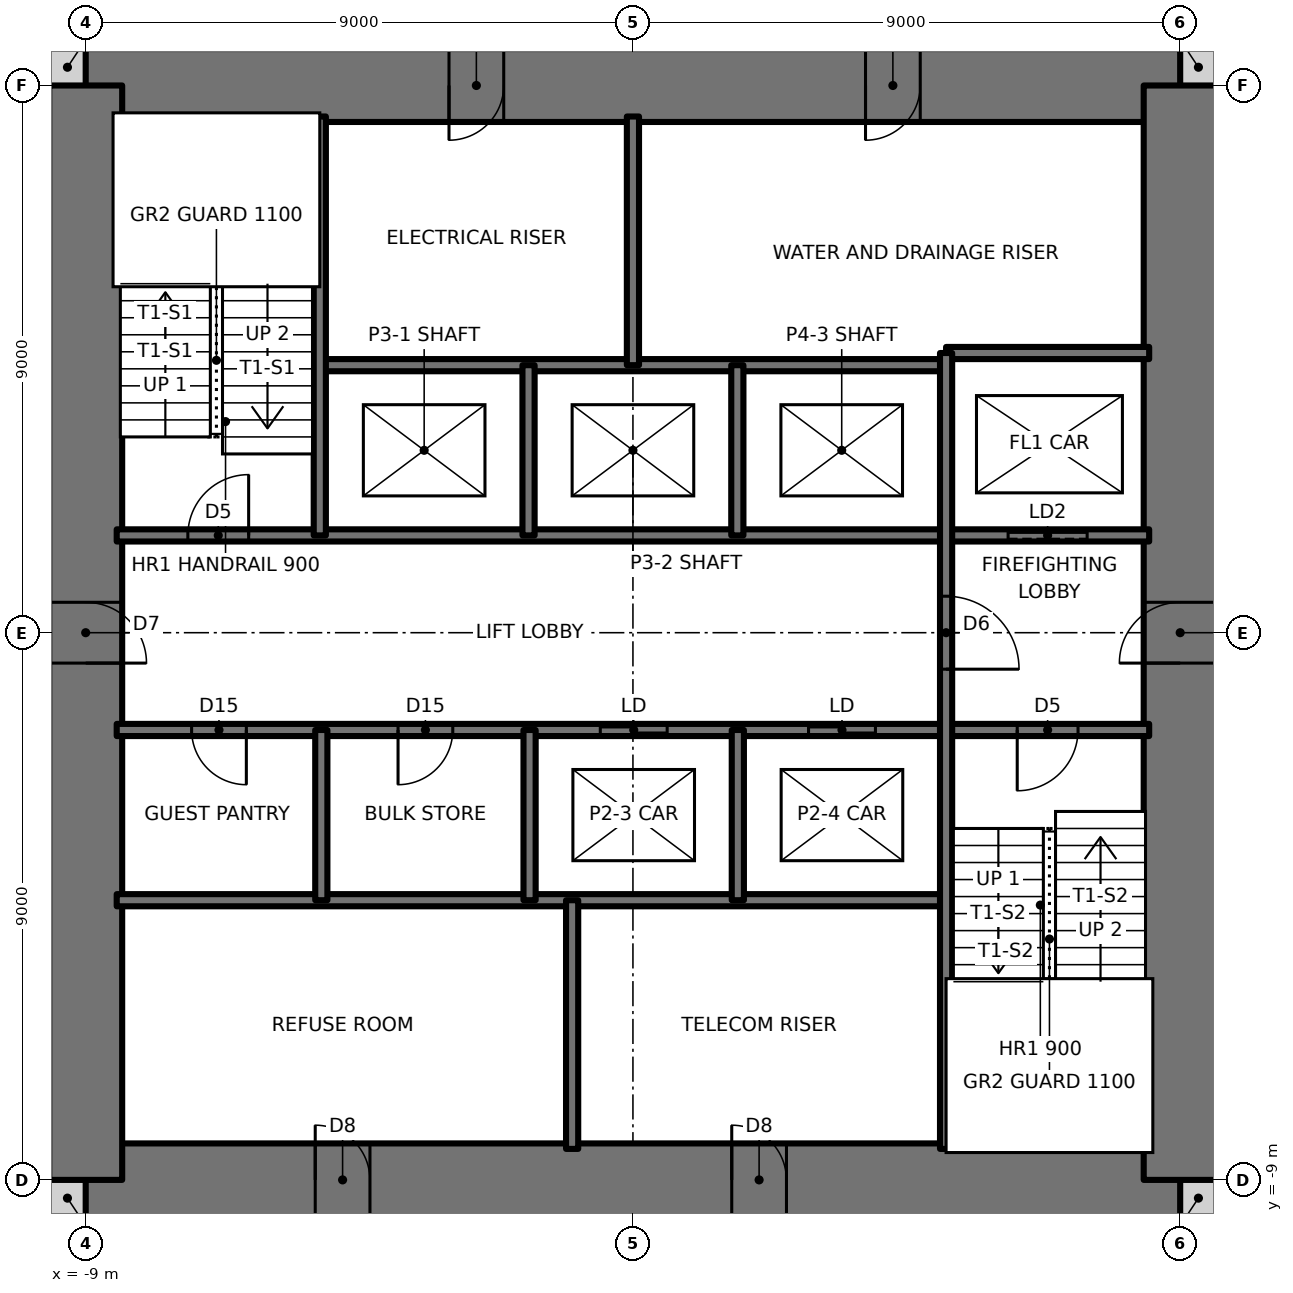
"""IFC4 building model, lengths in metres.
Left out: names, types, materials, properties, quantities, classifications, styles, units other than length and angle.
Written with IfcOpenShell. Run it as: python <this file> out.ifc"""

import sys

from ifc_helpers import new_model, si_unit, direction, frame, frame_2d, origin, place, context, subcontext, project, spatial, rectangle, extrude, element, fill, save


model = new_model("IFC4")
c1 = context("Model", 3, precision=1e-05, world=origin(), true_north=direction((0.0, 1.0)))
c2 = subcontext(c1, "Body", "Model", "MODEL_VIEW")
j1 = project(units=[si_unit("LENGTHUNIT", "METRE"), si_unit("PLANEANGLEUNIT", "RADIAN")], contexts=[c1])
p1 = place(None, origin())
s1 = spatial("IfcSite", under=j1, at=p1, CompositionType="ELEMENT")
p2 = place(p1, origin())
s2 = spatial("IfcBuilding", under=s1, at=p2, CompositionType="ELEMENT")
p3 = place(p2, frame((0.0, 0.0, 80.5)))
s3 = spatial("IfcBuildingStorey", under=s2, at=p3, CompositionType="ELEMENT", Elevation=80.5)
for number, where, z_axis, x_axis in (
    (1, (-9.6, -9.3, 0.0), (0.0, 0.0, 1.0), (1.0, 0.0, 0.0)),
    (2, (9.0, -9.3, 0.0), (0.0, 0.0, 1.0), (1.0, 0.0, 0.0)),
    (3, (9.0, 9.3, 0.0), (0.0, 0.0, 1.0), (1.0, 0.0, 0.0)),
    (4, (-9.6, 9.3, 0.0), (0.0, 0.0, 1.0), (1.0, 0.0, 0.0)),
):
    element("IfcWall", number, at=place(p3, frame(where, z_axis=z_axis, x_axis=x_axis)), inside=s3, PredefinedType="SOLIDWALL", context=c2, shape_type="SweptSolid", body=[
        extrude(rectangle(XDim=0.6, YDim=0.6, at=frame_2d((0.3, 0.0))), origin(), (0.0, 0.0, 1.0), 3.5),
    ])
p4 = place(p3, frame((-9.0, -9.0, 0.0), z_axis=(0.0, 0.0, 1.0), x_axis=(1.0, 0.0, 0.0)))
e5 = element("IfcWall", 5, at=p4, inside=s3, PredefinedType="SHEAR", context=c2, shape_type="SweptSolid", body=[
    extrude(rectangle(XDim=18.0, YDim=1.2, at=frame_2d((9.0, 0.0))), origin(), (0.0, 0.0, 1.0), 3.5),
])
p5 = place(p4, frame((3.775, 0.0, 0.0)))
e6 = element("IfcOpeningElement", 6, at=p5, cuts=e5, PredefinedType="OPENING", context=c2, shape_type="SweptSolid", body=[
    extrude(rectangle(XDim=0.9, YDim=2.1, at=frame_2d((0.45, 1.05))), frame((0.0, 0.61, 0.0), z_axis=(0.0, -1.0, 0.0), x_axis=(1.0, 0.0, 0.0)), (0.0, 0.0, 1.0), 1.22),
])
p6 = place(p4, frame((10.625, 0.0, 0.0)))
e7 = element("IfcOpeningElement", 7, at=p6, cuts=e5, PredefinedType="OPENING", context=c2, shape_type="SweptSolid", body=[
    extrude(rectangle(XDim=0.9, YDim=2.1, at=frame_2d((0.45, 1.05))), frame((0.0, 0.61, 0.0), z_axis=(0.0, -1.0, 0.0), x_axis=(1.0, 0.0, 0.0)), (0.0, 0.0, 1.0), 1.22),
])
p7 = place(p3, frame((9.0, 9.0, 0.0), z_axis=(0.0, 0.0, 1.0), x_axis=(-1.0, 0.0, 0.0)))
e8 = element("IfcWall", 8, at=p7, inside=s3, PredefinedType="SHEAR", context=c2, shape_type="SweptSolid", body=[
    extrude(rectangle(XDim=18.0, YDim=1.2, at=frame_2d((9.0, 0.0))), origin(), (0.0, 0.0, 1.0), 3.5),
])
p8 = place(p7, frame((11.125, 0.0, 0.0)))
e9 = element("IfcOpeningElement", 9, at=p8, cuts=e8, PredefinedType="OPENING", context=c2, shape_type="SweptSolid", body=[
    extrude(rectangle(XDim=0.9, YDim=2.1, at=frame_2d((0.45, 1.05))), frame((0.0, 0.61, 0.0), z_axis=(0.0, -1.0, 0.0), x_axis=(1.0, 0.0, 0.0)), (0.0, 0.0, 1.0), 1.22),
])
p9 = place(p7, frame((4.275, 0.0, 0.0)))
e10 = element("IfcOpeningElement", 10, at=p9, cuts=e8, PredefinedType="OPENING", context=c2, shape_type="SweptSolid", body=[
    extrude(rectangle(XDim=0.9, YDim=2.1, at=frame_2d((0.45, 1.05))), frame((0.0, 0.61, 0.0), z_axis=(0.0, -1.0, 0.0), x_axis=(1.0, 0.0, 0.0)), (0.0, 0.0, 1.0), 1.22),
])
p10 = place(p3, frame((9.0, -9.0, 0.0), z_axis=(0.0, 0.0, 1.0), x_axis=(0.0, 1.0, 0.0)))
e11 = element("IfcWall", 11, at=p10, inside=s3, PredefinedType="SHEAR", context=c2, shape_type="SweptSolid", body=[
    extrude(rectangle(XDim=18.0, YDim=1.2, at=frame_2d((9.0, 0.0))), origin(), (0.0, 0.0, 1.0), 3.5),
])
p11 = place(p10, frame((8.5, 0.0, 0.0)))
e12 = element("IfcOpeningElement", 12, at=p11, cuts=e11, PredefinedType="OPENING", context=c2, shape_type="SweptSolid", body=[
    extrude(rectangle(XDim=1.0, YDim=2.1, at=frame_2d((0.5, 1.05))), frame((0.0, 0.61, 0.0), z_axis=(0.0, -1.0, 0.0), x_axis=(1.0, 0.0, 0.0)), (0.0, 0.0, 1.0), 1.22),
])
p12 = place(p3, frame((-9.0, 9.0, 0.0), z_axis=(0.0, 0.0, 1.0), x_axis=(0.0, -1.0, 0.0)))
e13 = element("IfcWall", 13, at=p12, inside=s3, PredefinedType="SHEAR", context=c2, shape_type="SweptSolid", body=[
    extrude(rectangle(XDim=18.0, YDim=1.2, at=frame_2d((9.0, 0.0))), origin(), (0.0, 0.0, 1.0), 3.5),
])
p13 = place(p12, frame((8.5, 0.0, 0.0)))
e14 = element("IfcOpeningElement", 14, at=p13, cuts=e13, PredefinedType="OPENING", context=c2, shape_type="SweptSolid", body=[
    extrude(rectangle(XDim=1.0, YDim=2.1, at=frame_2d((0.5, 1.05))), frame((0.0, 0.61, 0.0), z_axis=(0.0, -1.0, 0.0), x_axis=(1.0, 0.0, 0.0)), (0.0, 0.0, 1.0), 1.22),
])
p14 = place(p3, frame((-8.49, -4.4, 0.0), z_axis=(0.0, 0.0, 1.0), x_axis=(1.0, 0.0, 0.0)))
e15 = element("IfcWall", 15, at=p14, inside=s3, PredefinedType="SOLIDWALL", context=c2, shape_type="SweptSolid", body=[
    extrude(rectangle(XDim=13.64, YDim=0.2, at=frame_2d((6.82, 0.0))), origin(), (0.0, 0.0, 1.0), 3.5),
])
p15 = place(p3, frame((-8.49, -1.6, 0.0), z_axis=(0.0, 0.0, 1.0), x_axis=(1.0, 0.0, 0.0)))
e16 = element("IfcWall", 16, at=p15, inside=s3, PredefinedType="SOLIDWALL", context=c2, shape_type="SweptSolid", body=[
    extrude(rectangle(XDim=16.98, YDim=0.2, at=frame_2d((8.49, 0.0))), origin(), (0.0, 0.0, 1.0), 3.5),
])
p16 = place(p15, frame((14.81, 0.0, 0.0)))
e17 = element("IfcOpeningElement", 17, at=p16, cuts=e16, PredefinedType="OPENING", context=c2, shape_type="SweptSolid", body=[
    extrude(rectangle(XDim=1.0, YDim=2.1, at=frame_2d((0.5, 1.05))), frame((0.0, 0.11, 0.0), z_axis=(0.0, -1.0, 0.0), x_axis=(1.0, 0.0, 0.0)), (0.0, 0.0, 1.0), 0.22),
])
p17 = place(p15, frame((1.232, 0.0, 0.0)))
e18 = element("IfcOpeningElement", 18, at=p17, cuts=e16, PredefinedType="OPENING", context=c2, shape_type="SweptSolid", body=[
    extrude(rectangle(XDim=0.9, YDim=2.1, at=frame_2d((0.45, 1.05))), frame((0.0, 0.11, 0.0), z_axis=(0.0, -1.0, 0.0), x_axis=(1.0, 0.0, 0.0)), (0.0, 0.0, 1.0), 0.22),
])
p18 = place(p15, frame((4.627, 0.0, 0.0)))
e19 = element("IfcOpeningElement", 19, at=p18, cuts=e16, PredefinedType="OPENING", context=c2, shape_type="SweptSolid", body=[
    extrude(rectangle(XDim=0.9, YDim=2.1, at=frame_2d((0.45, 1.05))), frame((0.0, 0.11, 0.0), z_axis=(0.0, -1.0, 0.0), x_axis=(1.0, 0.0, 0.0)), (0.0, 0.0, 1.0), 0.22),
])
p19 = place(p15, frame((7.953, 0.0, 0.0)))
e20 = element("IfcOpeningElement", 20, at=p19, cuts=e16, PredefinedType="OPENING", context=c2, shape_type="SweptSolid", body=[
    extrude(rectangle(XDim=1.1, YDim=2.1, at=frame_2d((0.55, 1.05))), frame((0.0, 0.11, 0.0), z_axis=(0.0, -1.0, 0.0), x_axis=(1.0, 0.0, 0.0)), (0.0, 0.0, 1.0), 0.22),
])
p20 = place(p15, frame((11.378, 0.0, 0.0)))
e21 = element("IfcOpeningElement", 21, at=p20, cuts=e16, PredefinedType="OPENING", context=c2, shape_type="SweptSolid", body=[
    extrude(rectangle(XDim=1.1, YDim=2.1, at=frame_2d((0.55, 1.05))), frame((0.0, 0.11, 0.0), z_axis=(0.0, -1.0, 0.0), x_axis=(1.0, 0.0, 0.0)), (0.0, 0.0, 1.0), 0.22),
])
p21 = place(p3, frame((-8.49, 1.6, 0.0), z_axis=(0.0, 0.0, 1.0), x_axis=(1.0, 0.0, 0.0)))
e22 = element("IfcWall", 22, at=p21, inside=s3, PredefinedType="SOLIDWALL", context=c2, shape_type="SweptSolid", body=[
    extrude(rectangle(XDim=16.98, YDim=0.2, at=frame_2d((8.49, 0.0))), origin(), (0.0, 0.0, 1.0), 3.5),
])
p22 = place(p21, frame((1.17, 0.0, 0.0)))
e23 = element("IfcOpeningElement", 23, at=p22, cuts=e22, PredefinedType="OPENING", context=c2, shape_type="SweptSolid", body=[
    extrude(rectangle(XDim=1.0, YDim=2.1, at=frame_2d((0.5, 1.05))), frame((0.0, 0.11, 0.0), z_axis=(0.0, -1.0, 0.0), x_axis=(1.0, 0.0, 0.0)), (0.0, 0.0, 1.0), 0.22),
])
p23 = place(p21, frame((14.66, 0.0, 0.0)))
e24 = element("IfcOpeningElement", 24, at=p23, cuts=e22, PredefinedType="OPENING", context=c2, shape_type="SweptSolid", body=[
    extrude(rectangle(XDim=1.3, YDim=2.1, at=frame_2d((0.65, 1.05))), frame((0.0, 0.11, 0.0), z_axis=(0.0, -1.0, 0.0), x_axis=(1.0, 0.0, 0.0)), (0.0, 0.0, 1.0), 0.22),
])
p24 = place(p3, frame((-5.15, 4.4, 0.0), z_axis=(0.0, 0.0, 1.0), x_axis=(1.0, 0.0, 0.0)))
e25 = element("IfcWall", 25, at=p24, inside=s3, PredefinedType="SOLIDWALL", context=c2, shape_type="SweptSolid", body=[
    extrude(rectangle(XDim=10.3, YDim=0.2, at=frame_2d((5.15, 0.0))), origin(), (0.0, 0.0, 1.0), 3.5),
])
p25 = place(p3, frame((5.15, 4.6, 0.0), z_axis=(0.0, 0.0, 1.0), x_axis=(1.0, 0.0, 0.0)))
e26 = element("IfcWall", 26, at=p25, inside=s3, PredefinedType="SOLIDWALL", context=c2, shape_type="SweptSolid", body=[
    extrude(rectangle(XDim=3.34, YDim=0.2, at=frame_2d((1.67, 0.0))), origin(), (0.0, 0.0, 1.0), 3.5),
])
p26 = place(p3, frame((5.15, -8.49, 0.0), z_axis=(0.0, 0.0, 1.0), x_axis=(0.0, 1.0, 0.0)))
e27 = element("IfcWall", 27, at=p26, inside=s3, PredefinedType="SOLIDWALL", context=c2, shape_type="SweptSolid", body=[
    extrude(rectangle(XDim=13.09, YDim=0.2, at=frame_2d((6.545, 0.0))), origin(), (0.0, 0.0, 1.0), 3.5),
])
p27 = place(p26, frame((7.89, 0.0, 0.0)))
e28 = element("IfcOpeningElement", 28, at=p27, cuts=e27, PredefinedType="OPENING", context=c2, shape_type="SweptSolid", body=[
    extrude(rectangle(XDim=1.2, YDim=2.1, at=frame_2d((0.6, 1.05))), frame((0.0, 0.11, 0.0), z_axis=(0.0, -1.0, 0.0), x_axis=(1.0, 0.0, 0.0)), (0.0, 0.0, 1.0), 0.22),
])
for number, where, z_axis, x_axis in (
    (29, (1.725, -4.4, 0.0), (0.0, 0.0, 1.0), (0.0, 1.0, 0.0)),
    (30, (1.717, 1.6, 0.0), (0.0, 0.0, 1.0), (0.0, 1.0, 0.0)),
):
    element("IfcWall", number, at=place(p3, frame(where, z_axis=z_axis, x_axis=x_axis)), inside=s3, PredefinedType="SOLIDWALL", context=c2, shape_type="SweptSolid", body=[
        extrude(rectangle(XDim=2.8, YDim=0.2, at=frame_2d((1.4, 0.0))), origin(), (0.0, 0.0, 1.0), 3.5),
    ])
for number, where, z_axis, x_axis in (
    (31, (0.0, 4.4, 0.0), (0.0, 0.0, 1.0), (0.0, 1.0, 0.0)),
    (32, (-1.0, -8.49, 0.0), (0.0, 0.0, 1.0), (0.0, 1.0, 0.0)),
):
    element("IfcWall", number, at=place(p3, frame(where, z_axis=z_axis, x_axis=x_axis)), inside=s3, PredefinedType="SOLIDWALL", context=c2, shape_type="SweptSolid", body=[
        extrude(rectangle(XDim=4.09, YDim=0.2, at=frame_2d((2.045, 0.0))), origin(), (0.0, 0.0, 1.0), 3.5),
    ])
for number, where, z_axis, x_axis in (
    (33, (-1.7, -4.4, 0.0), (0.0, 0.0, 1.0), (0.0, 1.0, 0.0)),
    (34, (-1.717, 1.6, 0.0), (0.0, 0.0, 1.0), (0.0, 1.0, 0.0)),
    (35, (-5.125, -4.4, 0.0), (0.0, 0.0, 1.0), (0.0, 1.0, 0.0)),
):
    element("IfcWall", number, at=place(p3, frame(where, z_axis=z_axis, x_axis=x_axis)), inside=s3, PredefinedType="SOLIDWALL", context=c2, shape_type="SweptSolid", body=[
        extrude(rectangle(XDim=2.8, YDim=0.2, at=frame_2d((1.4, 0.0))), origin(), (0.0, 0.0, 1.0), 3.5),
    ])
p28 = place(p3, frame((-5.15, 1.6, 0.0), z_axis=(0.0, 0.0, 1.0), x_axis=(0.0, 1.0, 0.0)))
e36 = element("IfcWall", 36, at=p28, inside=s3, PredefinedType="SOLIDWALL", context=c2, shape_type="SweptSolid", body=[
    extrude(rectangle(XDim=6.89, YDim=0.2, at=frame_2d((3.445, 0.0))), origin(), (0.0, 0.0, 1.0), 3.5),
])
p29 = place(p22, origin())
e37 = element("IfcDoor", 37, at=p29, inside=s3, OperationType="SINGLE_SWING_RIGHT", PredefinedType="DOOR", context=c2, shape_type="SweptSolid", body=[
    extrude(rectangle(XDim=1.0, YDim=2.1, at=frame_2d((0.5, 1.05))), frame((0.0, 0.025, 0.0), z_axis=(0.0, -1.0, 0.0), x_axis=(1.0, 0.0, 0.0)), (0.0, 0.0, 1.0), 0.05),
])
fill(e23, e37)
p30 = place(p16, frame((1.0, 0.0, 0.0), z_axis=(0.0, 0.0, 1.0), x_axis=(-1.0, 0.0, 0.0)))
e38 = element("IfcDoor", 38, at=p30, inside=s3, OperationType="SINGLE_SWING_RIGHT", PredefinedType="DOOR", context=c2, shape_type="SweptSolid", body=[
    extrude(rectangle(XDim=1.0, YDim=2.1, at=frame_2d((0.5, 1.05))), frame((0.0, 0.025, 0.0), z_axis=(0.0, -1.0, 0.0), x_axis=(1.0, 0.0, 0.0)), (0.0, 0.0, 1.0), 0.05),
])
fill(e17, e38)
p31 = place(p27, frame((1.2, 0.0, 0.0), z_axis=(0.0, 0.0, 1.0), x_axis=(-1.0, 0.0, 0.0)))
e39 = element("IfcDoor", 39, at=p31, inside=s3, OperationType="SINGLE_SWING_RIGHT", PredefinedType="DOOR", context=c2, shape_type="SweptSolid", body=[
    extrude(rectangle(XDim=1.2, YDim=2.1, at=frame_2d((0.6, 1.05))), frame((0.0, 0.025, 0.0), z_axis=(0.0, -1.0, 0.0), x_axis=(1.0, 0.0, 0.0)), (0.0, 0.0, 1.0), 0.05),
])
fill(e28, e39)
p32 = place(p17, frame((0.9, 0.0, 0.0), z_axis=(0.0, 0.0, 1.0), x_axis=(-1.0, 0.0, 0.0)))
e40 = element("IfcDoor", 40, at=p32, inside=s3, OperationType="SINGLE_SWING_LEFT", PredefinedType="DOOR", context=c2, shape_type="SweptSolid", body=[
    extrude(rectangle(XDim=0.9, YDim=2.1, at=frame_2d((0.45, 1.05))), frame((0.0, 0.025, 0.0), z_axis=(0.0, -1.0, 0.0), x_axis=(1.0, 0.0, 0.0)), (0.0, 0.0, 1.0), 0.05),
])
fill(e18, e40)
p33 = place(p18, frame((0.9, 0.0, 0.0), z_axis=(0.0, 0.0, 1.0), x_axis=(-1.0, 0.0, 0.0)))
e41 = element("IfcDoor", 41, at=p33, inside=s3, OperationType="SINGLE_SWING_RIGHT", PredefinedType="DOOR", context=c2, shape_type="SweptSolid", body=[
    extrude(rectangle(XDim=0.9, YDim=2.1, at=frame_2d((0.45, 1.05))), frame((0.0, 0.025, 0.0), z_axis=(0.0, -1.0, 0.0), x_axis=(1.0, 0.0, 0.0)), (0.0, 0.0, 1.0), 0.05),
])
fill(e19, e41)
p34 = place(p13, origin())
e42 = element("IfcDoor", 42, at=p34, inside=s3, OperationType="SINGLE_SWING_RIGHT", PredefinedType="DOOR", context=c2, shape_type="SweptSolid", body=[
    extrude(rectangle(XDim=1.0, YDim=2.1, at=frame_2d((0.5, 1.05))), frame((0.0, 0.025, 0.0), z_axis=(0.0, -1.0, 0.0), x_axis=(1.0, 0.0, 0.0)), (0.0, 0.0, 1.0), 0.05),
])
fill(e14, e42)
p35 = place(p11, origin())
e43 = element("IfcDoor", 43, at=p35, inside=s3, OperationType="SINGLE_SWING_LEFT", PredefinedType="DOOR", context=c2, shape_type="SweptSolid", body=[
    extrude(rectangle(XDim=1.0, YDim=2.1, at=frame_2d((0.5, 1.05))), frame((0.0, 0.025, 0.0), z_axis=(0.0, -1.0, 0.0), x_axis=(1.0, 0.0, 0.0)), (0.0, 0.0, 1.0), 0.05),
])
fill(e12, e43)
p36 = place(p8, origin())
e44 = element("IfcDoor", 44, at=p36, inside=s3, OperationType="SINGLE_SWING_RIGHT", PredefinedType="DOOR", context=c2, shape_type="SweptSolid", body=[
    extrude(rectangle(XDim=0.9, YDim=2.1, at=frame_2d((0.45, 1.05))), frame((0.0, 0.025, 0.0), z_axis=(0.0, -1.0, 0.0), x_axis=(1.0, 0.0, 0.0)), (0.0, 0.0, 1.0), 0.05),
])
fill(e9, e44)
p37 = place(p9, origin())
e45 = element("IfcDoor", 45, at=p37, inside=s3, OperationType="SINGLE_SWING_RIGHT", PredefinedType="DOOR", context=c2, shape_type="SweptSolid", body=[
    extrude(rectangle(XDim=0.9, YDim=2.1, at=frame_2d((0.45, 1.05))), frame((0.0, 0.025, 0.0), z_axis=(0.0, -1.0, 0.0), x_axis=(1.0, 0.0, 0.0)), (0.0, 0.0, 1.0), 0.05),
])
fill(e10, e45)
p38 = place(p5, origin())
e46 = element("IfcDoor", 46, at=p38, inside=s3, OperationType="SINGLE_SWING_LEFT", PredefinedType="DOOR", context=c2, shape_type="SweptSolid", body=[
    extrude(rectangle(XDim=0.9, YDim=2.1, at=frame_2d((0.45, 1.05))), frame((0.0, 0.025, 0.0), z_axis=(0.0, -1.0, 0.0), x_axis=(1.0, 0.0, 0.0)), (0.0, 0.0, 1.0), 0.05),
])
fill(e6, e46)
p39 = place(p6, origin())
e47 = element("IfcDoor", 47, at=p39, inside=s3, OperationType="SINGLE_SWING_LEFT", PredefinedType="DOOR", context=c2, shape_type="SweptSolid", body=[
    extrude(rectangle(XDim=0.9, YDim=2.1, at=frame_2d((0.45, 1.05))), frame((0.0, 0.025, 0.0), z_axis=(0.0, -1.0, 0.0), x_axis=(1.0, 0.0, 0.0)), (0.0, 0.0, 1.0), 0.05),
])
fill(e7, e47)
p40 = place(p19, origin())
e48 = element("IfcDoor", 48, at=p40, inside=s3, OperationType="DOUBLE_DOOR_SLIDING", PredefinedType="DOOR", context=c2, shape_type="SweptSolid", body=[
    extrude(rectangle(XDim=1.1, YDim=2.1, at=frame_2d((0.55, 1.05))), frame((0.0, 0.025, 0.0), z_axis=(0.0, -1.0, 0.0), x_axis=(1.0, 0.0, 0.0)), (0.0, 0.0, 1.0), 0.05),
])
fill(e20, e48)
p41 = place(p20, origin())
e49 = element("IfcDoor", 49, at=p41, inside=s3, OperationType="DOUBLE_DOOR_SLIDING", PredefinedType="DOOR", context=c2, shape_type="SweptSolid", body=[
    extrude(rectangle(XDim=1.1, YDim=2.1, at=frame_2d((0.55, 1.05))), frame((0.0, 0.025, 0.0), z_axis=(0.0, -1.0, 0.0), x_axis=(1.0, 0.0, 0.0)), (0.0, 0.0, 1.0), 0.05),
])
fill(e21, e49)
p42 = place(p23, origin())
e50 = element("IfcDoor", 50, at=p42, inside=s3, OperationType="SLIDING_TO_LEFT", PredefinedType="DOOR", context=c2, shape_type="SweptSolid", body=[
    extrude(rectangle(XDim=1.3, YDim=2.1, at=frame_2d((0.65, 1.05))), frame((0.0, 0.025, 0.0), z_axis=(0.0, -1.0, 0.0), x_axis=(1.0, 0.0, 0.0)), (0.0, 0.0, 1.0), 0.05),
])
fill(e24, e50)
save(model, sys.argv[1])
